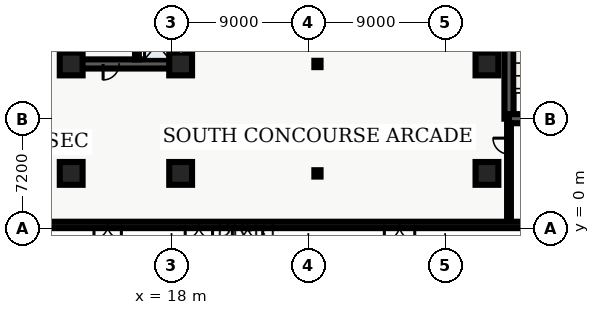
"""IFC4 building model, lengths in metres.
Left out: names, types, materials, properties, quantities, classifications, styles, units other than length and angle.
Written with IfcOpenShell. Run it as: python <this file> out.ifc"""

import sys

from ifc_helpers import new_model, entity, si_unit, converted_unit, direction, frame, origin_with_axes, origin_2d_with_axis, place, context, subcontext, project, spatial, polyline, rectangle, i_section, outline, extrude, element, fill, save


model = new_model("IFC4")
c1 = context("Model", 3, precision=1e-05, world=origin_with_axes(), true_north=direction((0.0, 1.0)))
c2 = subcontext(c1, "Body", "Model", "MODEL_VIEW")
j1 = project(units=[si_unit("LENGTHUNIT", "METRE"), converted_unit("PLANEANGLEUNIT", "DEGREE", entity("IfcPlaneAngleMeasure", 0.017), si_unit("PLANEANGLEUNIT", "RADIAN"), dimensions=[0, 0, 0, 0, 0, 0, 0])], contexts=[c1])
p1 = place(None, origin_with_axes())
s1 = spatial("IfcSite", under=j1, at=p1, CompositionType="ELEMENT")
p2 = place(p1, origin_with_axes())
s2 = spatial("IfcBuilding", under=s1, at=p2, CompositionType="ELEMENT")
p3 = place(p2, origin_with_axes())
s3 = spatial("IfcBuildingStorey", under=s2, at=p3, CompositionType="ELEMENT", Elevation=0.0)
p4 = place(p3, frame((11.4, 10.8, 0.0), z_axis=(0.0, 0.0, 1.0), x_axis=(0.0, 1.0, 0.0)))
e1 = element("IfcWall", 1, at=p4, inside=s3, PredefinedType="SHEAR", context=c2, shape_type="SweptSolid", body=[
    extrude(outline(polyline([(0.0, -0.3), (27.0, -0.3), (27.0, 0.3), (0.0, 0.3), (0.0, -0.3)])), origin_with_axes(), (0.0, 0.0, 1.0), 5.46),
])
p5 = place(p3, frame((18.6, 10.8, 0.0), z_axis=(0.0, 0.0, 1.0), x_axis=(-1.0, 0.0, 0.0)))
e2 = element("IfcWall", 2, at=p5, inside=s3, PredefinedType="SHEAR", context=c2, shape_type="SweptSolid", body=[
    extrude(outline(polyline([(0.0, -0.3), (7.2, -0.3), (7.2, 0.3), (0.0, 0.3), (0.0, -0.3)])), origin_with_axes(), (0.0, 0.0, 1.0), 5.46),
])
p6 = place(p5, frame((4.575, 0.0, 0.0), z_axis=(0.0, 0.0, 1.0), x_axis=(1.0, 0.0, 0.0)))
e3 = element("IfcOpeningElement", 3, at=p6, cuts=e2, PredefinedType="OPENING", context=c2, shape_type="SweptSolid", body=[
    extrude(rectangle(XDim=1.05, YDim=0.62, at=origin_2d_with_axis()), origin_with_axes(), (0.0, 0.0, 1.0), 2.15),
])
p7 = place(p3, frame((18.6, 10.8, 0.0), z_axis=(0.0, 0.0, 1.0), x_axis=(0.0, 1.0, 0.0)))
e4 = element("IfcWall", 4, at=p7, inside=s3, PredefinedType="SHEAR", context=c2, shape_type="SweptSolid", body=[
    extrude(outline(polyline([(0.0, -0.3), (13.5, -0.3), (13.5, 0.3), (0.0, 0.3), (0.0, -0.3)])), origin_with_axes(), (0.0, 0.0, 1.0), 5.46),
])
p8 = place(p7, frame((1.3, 0.0, 0.0), z_axis=(0.0, 0.0, 1.0), x_axis=(1.0, 0.0, 0.0)))
e5 = element("IfcOpeningElement", 5, at=p8, cuts=e4, PredefinedType="OPENING", context=c2, shape_type="SweptSolid", body=[
    extrude(rectangle(XDim=1.1, YDim=0.62, at=origin_2d_with_axis()), origin_with_axes(), (0.0, 0.0, 1.0), 2.15),
])
p9 = place(p7, frame((3.4, 0.0, 0.0), z_axis=(0.0, 0.0, 1.0), x_axis=(1.0, 0.0, 0.0)))
e6 = element("IfcOpeningElement", 6, at=p9, cuts=e4, PredefinedType="OPENING", context=c2, shape_type="SweptSolid", body=[
    extrude(rectangle(XDim=1.1, YDim=0.62, at=origin_2d_with_axis()), origin_with_axes(), (0.0, 0.0, 1.0), 2.15),
])
p10 = place(p7, frame((5.6, 0.0, 0.0), z_axis=(0.0, 0.0, 1.0), x_axis=(1.0, 0.0, 0.0)))
e7 = element("IfcOpeningElement", 7, at=p10, cuts=e4, PredefinedType="OPENING", context=c2, shape_type="SweptSolid", body=[
    extrude(rectangle(XDim=1.1, YDim=0.62, at=origin_2d_with_axis()), origin_with_axes(), (0.0, 0.0, 1.0), 2.15),
])
p11 = place(p7, frame((7.8, 0.0, 0.0), z_axis=(0.0, 0.0, 1.0), x_axis=(1.0, 0.0, 0.0)))
e8 = element("IfcOpeningElement", 8, at=p11, cuts=e4, PredefinedType="OPENING", context=c2, shape_type="SweptSolid", body=[
    extrude(rectangle(XDim=1.1, YDim=0.62, at=origin_2d_with_axis()), origin_with_axes(), (0.0, 0.0, 1.0), 2.15),
])
p12 = place(p7, frame((11.125, 0.0, 0.0), z_axis=(0.0, 0.0, 1.0), x_axis=(1.0, 0.0, 0.0)))
e9 = element("IfcOpeningElement", 9, at=p12, cuts=e4, PredefinedType="OPENING", context=c2, shape_type="SweptSolid", body=[
    extrude(rectangle(XDim=1.05, YDim=0.62, at=origin_2d_with_axis()), origin_with_axes(), (0.0, 0.0, 1.0), 2.15),
])
p13 = place(p3, frame((15.725, 11.1, 0.0), z_axis=(0.0, 0.0, 1.0), x_axis=(0.0, 1.0, 0.0)))
e10 = element("IfcWall", 10, at=p13, inside=s3, PredefinedType="SHEAR", context=c2, shape_type="SweptSolid", body=[
    extrude(outline(polyline([(0.0, -0.125), (8.6, -0.125), (8.6, 0.125), (0.0, 0.125), (0.0, -0.125)])), origin_with_axes(), (0.0, 0.0, 1.0), 5.46),
])
p14 = place(p3, frame((40.2, 7.2, 0.0), z_axis=(0.0, 0.0, 1.0), x_axis=(0.0, 1.0, 0.0)))
e11 = element("IfcWall", 11, at=p14, inside=s3, PredefinedType="SHEAR", context=c2, shape_type="SweptSolid", body=[
    extrude(outline(polyline([(0.0, -0.3), (15.6, -0.3), (15.6, 0.3), (0.0, 0.3), (0.0, -0.3)])), origin_with_axes(), (0.0, 0.0, 1.0), 5.46),
])
p15 = place(p14, frame((12.75, 0.0, 0.0), z_axis=(0.0, 0.0, 1.0), x_axis=(1.0, 0.0, 0.0)))
e12 = element("IfcOpeningElement", 12, at=p15, cuts=e11, PredefinedType="OPENING", context=c2, shape_type="SweptSolid", body=[
    extrude(rectangle(XDim=1.2, YDim=0.62, at=origin_2d_with_axis()), origin_with_axes(), (0.0, 0.0, 1.0), 2.15),
])
p16 = place(p14, frame((9.3, 0.0, 0.0), z_axis=(0.0, 0.0, 1.0), x_axis=(1.0, 0.0, 0.0)))
e13 = element("IfcOpeningElement", 13, at=p16, cuts=e11, PredefinedType="OPENING", context=c2, shape_type="SweptSolid", body=[
    extrude(rectangle(XDim=0.9, YDim=0.62, at=origin_2d_with_axis()), origin_with_axes(), (0.0, 0.0, 1.0), 2.15),
])
p17 = place(p3, frame((40.2, 7.2, 0.0), z_axis=(0.0, 0.0, 1.0), x_axis=(1.0, 0.0, 0.0)))
e14 = element("IfcWall", 14, at=p17, inside=s3, PredefinedType="SHEAR", context=c2, shape_type="SweptSolid", body=[
    extrude(outline(polyline([(0.0, -0.3), (7.85, -0.3), (7.85, 0.3), (0.0, 0.3), (0.0, -0.3)])), origin_with_axes(), (0.0, 0.0, 1.0), 5.46),
])
p18 = place(p17, frame((2.175, 0.0, 0.0), z_axis=(0.0, 0.0, 1.0), x_axis=(1.0, 0.0, 0.0)))
e15 = element("IfcOpeningElement", 15, at=p18, cuts=e14, PredefinedType="OPENING", context=c2, shape_type="SweptSolid", body=[
    extrude(rectangle(XDim=1.05, YDim=0.62, at=origin_2d_with_axis()), origin_with_axes(), (0.0, 0.0, 1.0), 2.15),
])
p19 = place(p3, frame((40.2, 0.42, 0.0), z_axis=(0.0, 0.0, 1.0), x_axis=(0.0, 1.0, 0.0)))
e16 = element("IfcWall", 16, at=p19, inside=s3, PredefinedType="SOLIDWALL", context=c2, shape_type="SweptSolid", body=[
    extrude(outline(polyline([(0.0, -0.125), (6.48, -0.125), (6.48, 0.125), (0.0, 0.125), (0.0, -0.125)])), origin_with_axes(), (0.0, 0.0, 1.0), 3.6),
])
p20 = place(p19, frame((4.975, 0.0, 0.0), z_axis=(0.0, 0.0, 1.0), x_axis=(1.0, 0.0, 0.0)))
e17 = element("IfcOpeningElement", 17, at=p20, cuts=e16, PredefinedType="OPENING", context=c2, shape_type="SweptSolid", body=[
    extrude(rectangle(XDim=1.05, YDim=0.27, at=origin_2d_with_axis()), origin_with_axes(), (0.0, 0.0, 1.0), 2.15),
])
for number, where, z_axis, x_axis in (
    (18, (11.4, 3.6, 0.0), (0.0, 0.0, 1.0), (1.0, 0.0, 0.0)),
    (19, (11.4, 10.8, 0.0), (0.0, 0.0, 1.0), (1.0, 0.0, 0.0)),
    (20, (18.6, 3.6, 0.0), (0.0, 0.0, 1.0), (1.0, 0.0, 0.0)),
    (21, (18.6, 10.8, 0.0), (0.0, 0.0, 1.0), (1.0, 0.0, 0.0)),
):
    element("IfcColumn", number, at=place(p3, frame(where, z_axis=z_axis, x_axis=x_axis)), inside=s3, PredefinedType="COLUMN", context=c2, shape_type="SweptSolid", body=[
        extrude(rectangle(XDim=1.5, YDim=1.5, at=origin_2d_with_axis()), origin_with_axes(), (0.0, 0.0, 1.0), 5.7),
    ])
for number, where, z_axis, x_axis in (
    (22, (27.6, 3.6, 0.0), (0.0, 0.0, 1.0), (1.0, 0.0, 0.0)),
    (23, (27.6, 10.8, 0.0), (0.0, 0.0, 1.0), (1.0, 0.0, 0.0)),
):
    element("IfcColumn", number, at=place(p3, frame(where, z_axis=z_axis, x_axis=x_axis)), inside=s3, PredefinedType="COLUMN", context=c2, shape_type="SweptSolid", body=[
        extrude(i_section(OverallWidth=0.406, OverallDepth=0.416, WebThickness=0.03, FlangeThickness=0.048, FilletRadius=0.022, at=origin_2d_with_axis()), origin_with_axes(), (0.0, 0.0, 1.0), 5.7),
    ])
for number, where, z_axis, x_axis in (
    (24, (38.75, 3.6, 0.0), (0.0, 0.0, 1.0), (1.0, 0.0, 0.0)),
    (25, (38.75, 10.8, 0.0), (0.0, 0.0, 1.0), (1.0, 0.0, 0.0)),
):
    element("IfcColumn", number, at=place(p3, frame(where, z_axis=z_axis, x_axis=x_axis)), inside=s3, PredefinedType="COLUMN", context=c2, shape_type="SweptSolid", body=[
        extrude(rectangle(XDim=1.5, YDim=1.5, at=origin_2d_with_axis()), origin_with_axes(), (0.0, 0.0, 1.0), 5.7),
    ])
p21 = place(p3, frame((67.98, 0.21, 0.0), z_axis=(0.0, 0.0, 1.0), x_axis=(-1.0, 0.0, 0.0)))
e26 = element("IfcWall", 26, at=p21, inside=s3, PredefinedType="SOLIDWALL", context=c2, shape_type="SweptSolid", body=[
    extrude(outline(polyline([(0.0, -0.21), (67.98, -0.21), (67.98, 0.21), (0.0, 0.21), (0.0, -0.21)])), origin_with_axes(), (0.0, 0.0, 1.0), 5.46),
])
p22 = place(p21, frame((64.88, 0.0, 0.0), z_axis=(0.0, 0.0, 1.0), x_axis=(1.0, 0.0, 0.0)))
e27 = element("IfcOpeningElement", 27, at=p22, cuts=e26, PredefinedType="OPENING", context=c2, shape_type="SweptSolid", body=[
    extrude(rectangle(XDim=1.8, YDim=0.44, at=origin_2d_with_axis()), origin_with_axes(), (0.0, 0.0, 1.0), 2.2),
])
p23 = place(p21, frame((54.18, 0.0, 0.0), z_axis=(0.0, 0.0, 1.0), x_axis=(1.0, 0.0, 0.0)))
e28 = element("IfcOpeningElement", 28, at=p23, cuts=e26, PredefinedType="OPENING", context=c2, shape_type="SweptSolid", body=[
    extrude(rectangle(XDim=1.8, YDim=0.44, at=origin_2d_with_axis()), origin_with_axes(), (0.0, 0.0, 1.0), 2.2),
])
p24 = place(p21, frame((48.18, 0.0, 0.0), z_axis=(0.0, 0.0, 1.0), x_axis=(1.0, 0.0, 0.0)))
e29 = element("IfcOpeningElement", 29, at=p24, cuts=e26, PredefinedType="OPENING", context=c2, shape_type="SweptSolid", body=[
    extrude(rectangle(XDim=1.8, YDim=0.44, at=origin_2d_with_axis()), origin_with_axes(), (0.0, 0.0, 1.0), 2.2),
])
p25 = place(p21, frame((44.98, 0.0, 0.0), z_axis=(0.0, 0.0, 1.0), x_axis=(1.0, 0.0, 0.0)))
e30 = element("IfcOpeningElement", 30, at=p25, cuts=e26, PredefinedType="OPENING", context=c2, shape_type="SweptSolid", body=[
    extrude(rectangle(XDim=2.0, YDim=0.44, at=origin_2d_with_axis()), origin_with_axes(), (0.0, 0.0, 1.0), 2.4),
])
p26 = place(p21, frame((34.98, 0.0, 0.0), z_axis=(0.0, 0.0, 1.0), x_axis=(1.0, 0.0, 0.0)))
e31 = element("IfcOpeningElement", 31, at=p26, cuts=e26, PredefinedType="OPENING", context=c2, shape_type="SweptSolid", body=[
    extrude(rectangle(XDim=2.0, YDim=0.44, at=origin_2d_with_axis()), origin_with_axes(), (0.0, 0.0, 1.0), 2.4),
])
p27 = place(p21, frame((25.78, 0.0, 0.0), z_axis=(0.0, 0.0, 1.0), x_axis=(1.0, 0.0, 0.0)))
e32 = element("IfcOpeningElement", 32, at=p27, cuts=e26, PredefinedType="OPENING", context=c2, shape_type="SweptSolid", body=[
    extrude(rectangle(XDim=1.8, YDim=0.44, at=origin_2d_with_axis()), origin_with_axes(), (0.0, 0.0, 1.0), 2.2),
])
p28 = place(p21, frame((12.58, 0.0, 0.0), z_axis=(0.0, 0.0, 1.0), x_axis=(1.0, 0.0, 0.0)))
e33 = element("IfcOpeningElement", 33, at=p28, cuts=e26, PredefinedType="OPENING", context=c2, shape_type="SweptSolid", body=[
    extrude(rectangle(XDim=2.0, YDim=0.44, at=origin_2d_with_axis()), origin_with_axes(), (0.0, 0.0, 1.0), 2.4),
])
p29 = place(p21, frame((4.48, 0.0, 0.0), z_axis=(0.0, 0.0, 1.0), x_axis=(1.0, 0.0, 0.0)))
e34 = element("IfcOpeningElement", 34, at=p29, cuts=e26, PredefinedType="OPENING", context=c2, shape_type="SweptSolid", body=[
    extrude(rectangle(XDim=2.0, YDim=0.44, at=origin_2d_with_axis()), origin_with_axes(), (0.0, 0.0, 1.0), 2.4),
])
p30 = place(p7, frame((1.3, 0.0, 0.0), z_axis=(0.0, 0.0, 1.0), x_axis=(1.0, 0.0, 0.0)))
e35 = element("IfcDoor", 35, at=p30, inside=s3, OperationType="SLIDING_TO_LEFT", PredefinedType="DOOR", context=c2, shape_type="SweptSolid", body=[
    extrude(rectangle(XDim=1.1, YDim=0.09, at=origin_2d_with_axis()), origin_with_axes(), (0.0, 0.0, 1.0), 2.15),
])
fill(e5, e35)
p31 = place(p5, frame((4.575, 0.0, 0.0), z_axis=(0.0, 0.0, 1.0), x_axis=(1.0, 0.0, 0.0)))
e36 = element("IfcDoor", 36, at=p31, inside=s3, OperationType="SINGLE_SWING_RIGHT", PredefinedType="DOOR", context=c2, shape_type="SweptSolid", body=[
    extrude(rectangle(XDim=1.05, YDim=0.09, at=origin_2d_with_axis()), origin_with_axes(), (0.0, 0.0, 1.0), 2.15),
])
fill(e3, e36)
p32 = place(p19, frame((4.975, 0.0, 0.0), z_axis=(0.0, 0.0, 1.0), x_axis=(1.0, 0.0, 0.0)))
e37 = element("IfcDoor", 37, at=p32, inside=s3, OperationType="SINGLE_SWING_RIGHT", PredefinedType="DOOR", context=c2, shape_type="SweptSolid", body=[
    extrude(rectangle(XDim=1.05, YDim=0.09, at=origin_2d_with_axis()), origin_with_axes(), (0.0, 0.0, 1.0), 2.15),
])
fill(e17, e37)
p33 = place(p21, frame((54.18, 0.0, 0.0), z_axis=(0.0, 0.0, 1.0), x_axis=(1.0, 0.0, 0.0)))
e38 = element("IfcDoor", 38, at=p33, inside=s3, OperationType="DOUBLE_DOOR_SINGLE_SWING", PredefinedType="DOOR", context=c2, shape_type="SweptSolid", body=[
    extrude(rectangle(XDim=1.8, YDim=0.09, at=origin_2d_with_axis()), origin_with_axes(), (0.0, 0.0, 1.0), 2.2),
])
fill(e28, e38)
p34 = place(p21, frame((48.18, 0.0, 0.0), z_axis=(0.0, 0.0, 1.0), x_axis=(1.0, 0.0, 0.0)))
e39 = element("IfcDoor", 39, at=p34, inside=s3, OperationType="DOUBLE_DOOR_SINGLE_SWING", PredefinedType="DOOR", context=c2, shape_type="SweptSolid", body=[
    extrude(rectangle(XDim=1.8, YDim=0.09, at=origin_2d_with_axis()), origin_with_axes(), (0.0, 0.0, 1.0), 2.2),
])
fill(e29, e39)
p35 = place(p21, frame((44.98, 0.0, 0.0), z_axis=(0.0, 0.0, 1.0), x_axis=(1.0, 0.0, 0.0)))
e40 = element("IfcDoor", 40, at=p35, inside=s3, OperationType="DOUBLE_DOOR_SINGLE_SWING", PredefinedType="DOOR", context=c2, shape_type="SweptSolid", body=[
    extrude(rectangle(XDim=2.0, YDim=0.09, at=origin_2d_with_axis()), origin_with_axes(), (0.0, 0.0, 1.0), 2.4),
])
fill(e30, e40)
p36 = place(p21, frame((34.98, 0.0, 0.0), z_axis=(0.0, 0.0, 1.0), x_axis=(1.0, 0.0, 0.0)))
e41 = element("IfcDoor", 41, at=p36, inside=s3, OperationType="DOUBLE_DOOR_SINGLE_SWING", PredefinedType="DOOR", context=c2, shape_type="SweptSolid", body=[
    extrude(rectangle(XDim=2.0, YDim=0.09, at=origin_2d_with_axis()), origin_with_axes(), (0.0, 0.0, 1.0), 2.4),
])
fill(e31, e41)
save(model, sys.argv[1])
